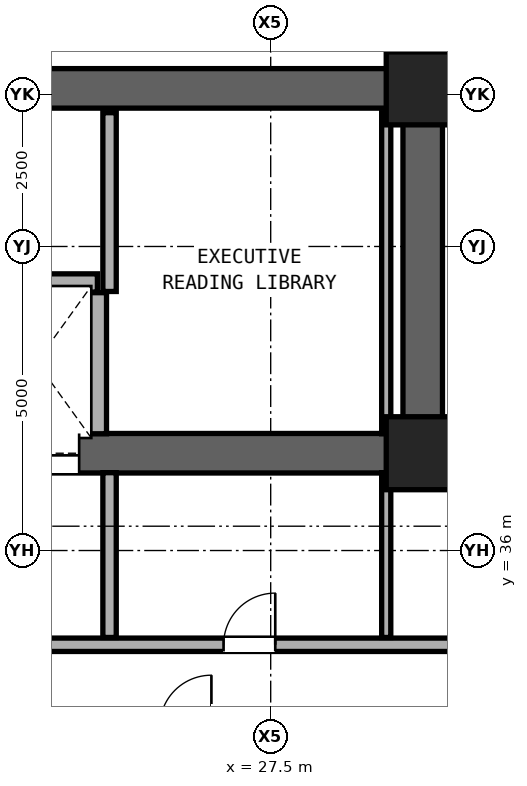
"""IFC4 building model, lengths in metres.
Left out: names, types, materials, properties, quantities, classifications, styles, units other than length and angle.
Written with IfcOpenShell. Run it as: python <this file> out.ifc"""

import sys

from ifc_helpers import new_model, si_unit, direction, frame, frame_2d, origin, origin_2d, place, context, subcontext, project, spatial, rectangle, extrude, element, fill, save


model = new_model("IFC4")
c1 = context("Model", 3, precision=1e-05, world=origin(), true_north=direction((0.0, 1.0)))
c2 = subcontext(c1, "Body", "Model", "MODEL_VIEW")
j1 = project(units=[si_unit("LENGTHUNIT", "METRE"), si_unit("PLANEANGLEUNIT", "RADIAN")], contexts=[c1])
p1 = place(None, origin())
s1 = spatial("IfcSite", under=j1, at=p1, CompositionType="ELEMENT")
p2 = place(p1, origin())
s2 = spatial("IfcBuilding", under=s1, at=p2, CompositionType="ELEMENT")
p3 = place(p2, frame((0.0, 0.0, 108.2)))
s3 = spatial("IfcBuildingStorey", under=s2, at=p3, CompositionType="ELEMENT", Elevation=108.2)
for number, where, z_axis, x_axis in (
    (1, (30.0, 37.6, 0.0), (0.0, 0.0, 1.0), (1.0, 0.0, 0.0)),
    (2, (30.0, 43.6, 0.0), (0.0, 0.0, 1.0), (1.0, 0.0, 0.0)),
):
    element("IfcColumn", number, at=place(p3, frame(where, z_axis=z_axis, x_axis=x_axis)), inside=s3, PredefinedType="COLUMN", context=c2, shape_type="SweptSolid", body=[
        extrude(rectangle(XDim=1.2, YDim=1.2, at=origin_2d()), origin(), (0.0, 0.0, 1.0), 3.3),
    ])
p4 = place(p3, frame((11.0, 43.6, 0.0), z_axis=(0.0, 0.0, 1.0), x_axis=(1.0, 0.0, 0.0)))
e3 = element("IfcWall", 3, at=p4, inside=s3, PredefinedType="SHEAR", context=c2, shape_type="SweptSolid", body=[
    extrude(rectangle(XDim=19.0, YDim=0.65, at=frame_2d((9.5, 0.0))), origin(), (0.0, 0.0, 1.0), 3.08),
])
p5 = place(p3, frame((30.0, 37.6, 0.0), z_axis=(0.0, 0.0, 1.0), x_axis=(0.0, 1.0, 0.0)))
e4 = element("IfcWall", 4, at=p5, inside=s3, PredefinedType="SHEAR", context=c2, shape_type="SweptSolid", body=[
    extrude(rectangle(XDim=6.0, YDim=0.65, at=frame_2d((3.0, 0.0))), origin(), (0.0, 0.0, 1.0), 3.08),
])
p6 = place(p3, frame((11.0, 37.6, 0.0), z_axis=(0.0, 0.0, 1.0), x_axis=(1.0, 0.0, 0.0)))
e5 = element("IfcWall", 5, at=p6, inside=s3, PredefinedType="SHEAR", context=c2, shape_type="SweptSolid", body=[
    extrude(rectangle(XDim=19.0, YDim=0.65, at=frame_2d((9.5, 0.0))), origin(), (0.0, 0.0, 1.0), 3.08),
])
p7 = place(p6, frame((1.06, 0.0, 0.0)))
e6 = element("IfcOpeningElement", 6, at=p7, cuts=e5, PredefinedType="OPENING", context=c2, shape_type="SweptSolid", body=[
    extrude(rectangle(XDim=1.15, YDim=2.2, at=frame_2d((0.575, 1.1))), frame((0.0, 0.335, 0.0), z_axis=(0.0, -1.0, 0.0), x_axis=(1.0, 0.0, 0.0)), (0.0, 0.0, 1.0), 0.67),
])
p8 = place(p6, frame((9.55, 0.0, 0.0)))
e7 = element("IfcOpeningElement", 7, at=p8, cuts=e5, PredefinedType="OPENING", context=c2, shape_type="SweptSolid", body=[
    extrude(rectangle(XDim=1.4, YDim=2.35, at=frame_2d((0.7, 1.175))), frame((0.0, 0.335, 0.0), z_axis=(0.0, -1.0, 0.0), x_axis=(1.0, 0.0, 0.0)), (0.0, 0.0, 1.0), 0.67),
])
p9 = place(p6, frame((11.95, 0.0, 0.0)))
e8 = element("IfcOpeningElement", 8, at=p9, cuts=e5, PredefinedType="OPENING", context=c2, shape_type="SweptSolid", body=[
    extrude(rectangle(XDim=1.4, YDim=2.35, at=frame_2d((0.7, 1.175))), frame((0.0, 0.335, 0.0), z_axis=(0.0, -1.0, 0.0), x_axis=(1.0, 0.0, 0.0)), (0.0, 0.0, 1.0), 0.67),
])
p10 = place(p3, frame((15.59, 34.45, 0.0), z_axis=(0.0, 0.0, 1.0), x_axis=(1.0, 0.0, 0.0)))
e9 = element("IfcWall", 9, at=p10, inside=s3, PredefinedType="SOLIDWALL", context=c2, shape_type="SweptSolid", body=[
    extrude(rectangle(XDim=15.17, YDim=0.22, at=frame_2d((7.585, 0.0))), origin(), (0.0, 0.0, 1.0), 2.124),
])
p11 = place(p10, frame((6.435, 0.0, 0.0)))
e10 = element("IfcOpeningElement", 10, at=p11, cuts=e9, PredefinedType="OPENING", context=c2, shape_type="SweptSolid", body=[
    extrude(rectangle(XDim=0.85, YDim=2.01, at=frame_2d((0.425, 1.005))), frame((0.0, 0.12, 0.0), z_axis=(0.0, -1.0, 0.0), x_axis=(1.0, 0.0, 0.0)), (0.0, 0.0, 1.0), 0.24),
])
p12 = place(p10, frame((11.135, 0.0, 0.0)))
e11 = element("IfcOpeningElement", 11, at=p12, cuts=e9, PredefinedType="OPENING", context=c2, shape_type="SweptSolid", body=[
    extrude(rectangle(XDim=0.85, YDim=2.01, at=frame_2d((0.425, 1.005))), frame((0.0, 0.12, 0.0), z_axis=(0.0, -1.0, 0.0), x_axis=(1.0, 0.0, 0.0)), (0.0, 0.0, 1.0), 0.24),
])
p13 = place(p10, frame((1.775, 0.0, 0.0)))
e12 = element("IfcOpeningElement", 12, at=p13, cuts=e9, PredefinedType="OPENING", context=c2, shape_type="SweptSolid", body=[
    extrude(rectangle(XDim=0.85, YDim=2.01, at=frame_2d((0.425, 1.005))), frame((0.0, 0.12, 0.0), z_axis=(0.0, -1.0, 0.0), x_axis=(1.0, 0.0, 0.0)), (0.0, 0.0, 1.0), 0.24),
])
p14 = place(p3, frame((20.25, 40.4, 0.0), z_axis=(0.0, 0.0, 1.0), x_axis=(1.0, 0.0, 0.0)))
e13 = element("IfcWall", 13, at=p14, inside=s3, PredefinedType="SOLIDWALL", context=c2, shape_type="SweptSolid", body=[
    extrude(rectangle(XDim=4.4, YDim=0.3, at=frame_2d((2.2, 0.0))), origin(), (0.0, 0.0, 1.0), 3.08),
])
p15 = place(p3, frame((30.32, 43.75, 0.0), z_axis=(0.0, 0.0, 1.0), x_axis=(1.0, 0.0, 0.0)))
e14 = element("IfcWall", 14, at=p15, inside=s3, PredefinedType="PARTITIONING", context=c2, shape_type="SweptSolid", body=[
    extrude(rectangle(XDim=0.44, YDim=0.15, at=frame_2d((0.22, 0.0))), origin(), (0.0, 0.0, 1.0), 3.08),
])
p16 = place(p3, frame((24.65, 37.92, 0.0), z_axis=(0.0, 0.0, 1.0), x_axis=(0.0, 1.0, 0.0)))
e15 = element("IfcWall", 15, at=p16, inside=s3, PredefinedType="SOLIDWALL", context=c2, shape_type="SweptSolid", body=[
    extrude(rectangle(XDim=2.32, YDim=0.3, at=frame_2d((1.16, 0.0))), origin(), (0.0, 0.0, 1.0), 3.08),
])
p17 = place(p3, frame((24.85, 34.57, 0.0), z_axis=(0.0, 0.0, 1.0), x_axis=(0.0, 1.0, 0.0)))
e16 = element("IfcWall", 16, at=p17, inside=s3, PredefinedType="SOLIDWALL", context=c2, shape_type="SweptSolid", body=[
    extrude(rectangle(XDim=2.71, YDim=0.22, at=frame_2d((1.355, 0.0))), origin(), (0.0, 0.0, 1.0), 3.08),
])
p18 = place(p3, frame((24.85, 40.26, 0.0), z_axis=(0.0, 0.0, 1.0), x_axis=(0.0, 1.0, 0.0)))
e17 = element("IfcWall", 17, at=p18, inside=s3, PredefinedType="SOLIDWALL", context=c2, shape_type="SweptSolid", body=[
    extrude(rectangle(XDim=2.94, YDim=0.22, at=frame_2d((1.47, 0.0))), origin(), (0.0, 0.0, 1.0), 3.08),
])
p19 = place(p3, frame((29.4, 34.57, 0.0), z_axis=(0.0, 0.0, 1.0), x_axis=(0.0, 1.0, 0.0)))
e18 = element("IfcWall", 18, at=p19, inside=s3, PredefinedType="PARTITIONING", context=c2, shape_type="SweptSolid", body=[
    extrude(rectangle(XDim=2.71, YDim=0.15, at=frame_2d((1.355, 0.0))), origin(), (0.0, 0.0, 1.0), 3.08),
])
p20 = place(p3, frame((29.4, 37.92, 0.0), z_axis=(0.0, 0.0, 1.0), x_axis=(0.0, 1.0, 0.0)))
e19 = element("IfcWall", 19, at=p20, inside=s3, PredefinedType="PARTITIONING", context=c2, shape_type="SweptSolid", body=[
    extrude(rectangle(XDim=5.28, YDim=0.15, at=frame_2d((2.64, 0.0))), origin(), (0.0, 0.0, 1.0), 3.08),
])
p21 = place(p12, origin())
e20 = element("IfcDoor", 20, at=p21, inside=s3, OperationType="SINGLE_SWING_RIGHT", PredefinedType="DOOR", context=c2, shape_type="SweptSolid", body=[
    extrude(rectangle(XDim=0.85, YDim=2.01, at=frame_2d((0.425, 1.005))), frame((0.0, 0.025, 0.0), z_axis=(0.0, -1.0, 0.0), x_axis=(1.0, 0.0, 0.0)), (0.0, 0.0, 1.0), 0.05),
])
fill(e11, e20)
p22 = place(p9, origin())
e21 = element("IfcDoor", 21, at=p22, inside=s3, OperationType="DOUBLE_DOOR_SLIDING", PredefinedType="DOOR", context=c2, shape_type="SweptSolid", body=[
    extrude(rectangle(XDim=1.4, YDim=2.35, at=frame_2d((0.7, 1.175))), frame((0.0, 0.025, 0.0), z_axis=(0.0, -1.0, 0.0), x_axis=(1.0, 0.0, 0.0)), (0.0, 0.0, 1.0), 0.05),
])
fill(e8, e21)
save(model, sys.argv[1])
